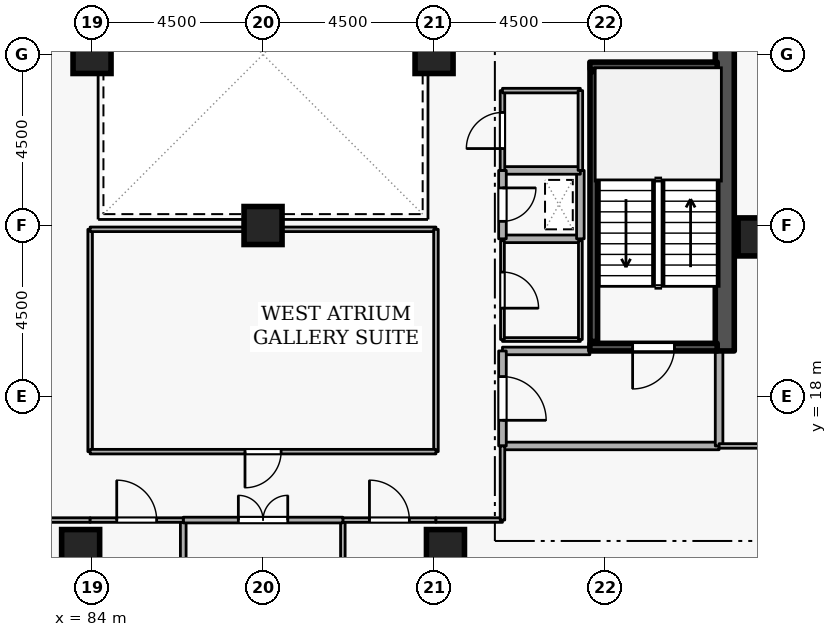
"""IFC4 building model, lengths in metres.
Left out: names, types, materials, properties, quantities, classifications, styles, units other than length and angle.
Written with IfcOpenShell. Run it as: python <this file> out.ifc"""

import sys

from ifc_helpers import new_model, si_unit, direction, frame, frame_2d, origin, origin_2d, place, context, subcontext, project, spatial, rectangle, extrude, element, fill, save


model = new_model("IFC4")
c1 = context("Model", 3, precision=1e-05, world=origin(), true_north=direction((0.0, 1.0)))
c2 = subcontext(c1, "Body", "Model", "MODEL_VIEW")
j1 = project(units=[si_unit("LENGTHUNIT", "METRE"), si_unit("PLANEANGLEUNIT", "RADIAN")], contexts=[c1])
p1 = place(None, origin())
s1 = spatial("IfcSite", under=j1, at=p1, CompositionType="ELEMENT")
p2 = place(p1, origin())
s2 = spatial("IfcBuilding", under=s1, at=p2, CompositionType="ELEMENT")
p3 = place(p2, frame((0.0, 0.0, 203.7)))
s3 = spatial("IfcBuildingStorey", under=s2, at=p3, CompositionType="ELEMENT", Elevation=203.7)
p4 = place(p3, frame((100.65, 19.2, 0.0), z_axis=(0.0, 0.0, 1.0), x_axis=(0.0, 1.0, 0.0)))
e1 = element("IfcWall", 1, at=p4, inside=s3, PredefinedType="SHEAR", context=c2, shape_type="SweptSolid", body=[
    extrude(rectangle(XDim=15.6, YDim=0.5, at=frame_2d((7.8, 0.0))), origin(), (0.0, 0.0, 1.0), 3.6),
])
for number, where, z_axis, x_axis in (
    (2, (93.3, 14.0, 0.0), (0.0, 0.0, 1.0), (1.0, 0.0, 0.0)),
    (3, (83.7, 14.0, 0.0), (0.0, 0.0, 1.0), (1.0, 0.0, 0.0)),
    (4, (101.5, 22.2, 0.0), (0.0, 0.0, 1.0), (1.0, 0.0, 0.0)),
    (5, (93.0, 27.0, 0.0), (0.0, 0.0, 1.0), (1.0, 0.0, 0.0)),
    (6, (84.0, 27.0, 0.0), (0.0, 0.0, 1.0), (1.0, 0.0, 0.0)),
    (7, (88.5, 22.5, 0.0), (0.0, 0.0, 1.0), (1.0, 0.0, 0.0)),
):
    element("IfcColumn", number, at=place(p3, frame(where, z_axis=z_axis, x_axis=x_axis)), inside=s3, PredefinedType="COLUMN", context=c2, shape_type="SweptSolid", body=[
        extrude(rectangle(XDim=1.0, YDim=1.0, at=origin_2d()), origin(), (0.0, 0.0, 1.0), 3.6),
    ])
p5 = place(p3, frame((100.45, 19.3, 0.0), z_axis=(0.0, 0.0, 1.0), x_axis=(-1.0, 0.0, 0.0)))
e8 = element("IfcWall", 8, at=p5, inside=s3, PredefinedType="SHEAR", context=c2, shape_type="SweptSolid", body=[
    extrude(rectangle(XDim=3.35, YDim=0.2, at=frame_2d((1.675, 0.0))), origin(), (0.0, 0.0, 1.0), 3.6),
])
p6 = place(p5, frame((1.125, 0.0, 0.0)))
e9 = element("IfcOpeningElement", 9, at=p6, cuts=e8, PredefinedType="OPENING", context=c2, shape_type="SweptSolid", body=[
    extrude(rectangle(XDim=1.1, YDim=2.1, at=frame_2d((0.55, 1.05))), frame((0.0, 0.11, 0.0), z_axis=(0.0, -1.0, 0.0), x_axis=(1.0, 0.0, 0.0)), (0.0, 0.0, 1.0), 0.22),
])
p7 = place(p3, frame((97.1, 26.7, 0.0), z_axis=(0.0, 0.0, 1.0), x_axis=(1.0, 0.0, 0.0)))
e10 = element("IfcWall", 10, at=p7, inside=s3, PredefinedType="SHEAR", context=c2, shape_type="SweptSolid", body=[
    extrude(rectangle(XDim=3.35, YDim=0.2, at=frame_2d((1.675, 0.0))), origin(), (0.0, 0.0, 1.0), 3.6),
])
p8 = place(p3, frame((97.203, 26.55, 0.0), z_axis=(0.0, 0.0, 1.0), x_axis=(0.0, -1.0, 0.0)))
e11 = element("IfcWall", 11, at=p8, inside=s3, PredefinedType="SHEAR", context=c2, shape_type="SweptSolid", body=[
    extrude(rectangle(XDim=7.1, YDim=0.2, at=frame_2d((3.55, 0.0))), origin(), (0.0, 0.0, 1.0), 3.6),
])
p9 = place(p3, frame((94.8, 16.7, 0.0), z_axis=(0.0, 0.0, 1.0), x_axis=(1.0, 0.0, 0.0)))
e12 = element("IfcWall", 12, at=p9, inside=s3, PredefinedType="STANDARD", context=c2, shape_type="SweptSolid", body=[
    extrude(rectangle(XDim=5.7, YDim=0.2, at=frame_2d((2.85, 0.0))), origin(), (0.0, 0.0, 1.0), 3.34),
])
p10 = place(p3, frame((100.5, 16.7, 0.0), z_axis=(0.0, 0.0, 1.0), x_axis=(0.0, 1.0, 0.0)))
e13 = element("IfcWall", 13, at=p10, inside=s3, PredefinedType="STANDARD", context=c2, shape_type="SweptSolid", body=[
    extrude(rectangle(XDim=2.5, YDim=0.2, at=frame_2d((1.25, 0.0))), origin(), (0.0, 0.0, 1.0), 3.34),
])
p11 = place(p3, frame((97.1, 19.2, 0.0), z_axis=(0.0, 0.0, 1.0), x_axis=(-1.0, 0.0, 0.0)))
e14 = element("IfcWall", 14, at=p11, inside=s3, PredefinedType="STANDARD", context=c2, shape_type="SweptSolid", body=[
    extrude(rectangle(XDim=2.3, YDim=0.2, at=frame_2d((1.15, 0.0))), origin(), (0.0, 0.0, 1.0), 2.545),
])
p12 = place(p3, frame((94.8, 19.2, 0.0), z_axis=(0.0, 0.0, 1.0), x_axis=(0.0, -1.0, 0.0)))
e15 = element("IfcWall", 15, at=p12, inside=s3, PredefinedType="STANDARD", context=c2, shape_type="SweptSolid", body=[
    extrude(rectangle(XDim=2.5, YDim=0.2, at=frame_2d((1.25, 0.0))), origin(), (0.0, 0.0, 1.0), 3.34),
])
p13 = place(p12, frame((0.675, 0.0, 0.0)))
e16 = element("IfcOpeningElement", 16, at=p13, cuts=e15, PredefinedType="OPENING", context=c2, shape_type="SweptSolid", body=[
    extrude(rectangle(XDim=1.15, YDim=2.1, at=frame_2d((0.575, 1.05))), frame((0.0, 0.11, 0.0), z_axis=(0.0, -1.0, 0.0), x_axis=(1.0, 0.0, 0.0)), (0.0, 0.0, 1.0), 0.22),
])
p14 = place(p3, frame((94.8, 22.15, 0.0), z_axis=(0.0, 0.0, 1.0), x_axis=(1.0, 0.0, 0.0)))
e17 = element("IfcWall", 17, at=p14, inside=s3, PredefinedType="STANDARD", context=c2, shape_type="SweptSolid", body=[
    extrude(rectangle(XDim=2.05, YDim=0.2, at=frame_2d((1.025, 0.0))), origin(), (0.0, 0.0, 1.0), 3.34),
])
p15 = place(p3, frame((96.85, 22.15, 0.0), z_axis=(0.0, 0.0, 1.0), x_axis=(0.0, 1.0, 0.0)))
e18 = element("IfcWall", 18, at=p15, inside=s3, PredefinedType="STANDARD", context=c2, shape_type="SweptSolid", body=[
    extrude(rectangle(XDim=1.8, YDim=0.2, at=frame_2d((0.9, 0.0))), origin(), (0.0, 0.0, 1.0), 3.34),
])
p16 = place(p3, frame((96.85, 23.95, 0.0), z_axis=(0.0, 0.0, 1.0), x_axis=(-1.0, 0.0, 0.0)))
e19 = element("IfcWall", 19, at=p16, inside=s3, PredefinedType="STANDARD", context=c2, shape_type="SweptSolid", body=[
    extrude(rectangle(XDim=2.05, YDim=0.2, at=frame_2d((1.025, 0.0))), origin(), (0.0, 0.0, 1.0), 3.34),
])
p17 = place(p3, frame((94.8, 23.95, 0.0), z_axis=(0.0, 0.0, 1.0), x_axis=(0.0, -1.0, 0.0)))
e20 = element("IfcWall", 20, at=p17, inside=s3, PredefinedType="STANDARD", context=c2, shape_type="SweptSolid", body=[
    extrude(rectangle(XDim=1.8, YDim=0.2, at=frame_2d((0.9, 0.0))), origin(), (0.0, 0.0, 1.0), 3.34),
])
p18 = place(p17, frame((0.46, 0.0, 0.0)))
e21 = element("IfcOpeningElement", 21, at=p18, cuts=e20, PredefinedType="OPENING", context=c2, shape_type="SweptSolid", body=[
    extrude(rectangle(XDim=0.88, YDim=2.04, at=frame_2d((0.44, 1.02))), frame((0.0, 0.11, 0.0), z_axis=(0.0, -1.0, 0.0), x_axis=(1.0, 0.0, 0.0)), (0.0, 0.0, 1.0), 0.22),
])
p19 = place(p3, frame((94.8, 19.5, 0.0), z_axis=(0.0, 0.0, 1.0), x_axis=(1.0, 0.0, 0.0)))
e22 = element("IfcWall", 22, at=p19, inside=s3, PredefinedType="PARTITIONING", context=c2, shape_type="SweptSolid", body=[
    extrude(rectangle(XDim=2.05, YDim=0.1, at=frame_2d((1.025, 0.0))), origin(), (0.0, 0.0, 1.0), 2.545),
])
p20 = place(p3, frame((96.85, 19.5, 0.0), z_axis=(0.0, 0.0, 1.0), x_axis=(0.0, 1.0, 0.0)))
e23 = element("IfcWall", 23, at=p20, inside=s3, PredefinedType="PARTITIONING", context=c2, shape_type="SweptSolid", body=[
    extrude(rectangle(XDim=2.6, YDim=0.1, at=frame_2d((1.3, 0.0))), origin(), (0.0, 0.0, 1.0), 3.34),
])
p21 = place(p3, frame((94.8, 22.1, 0.0), z_axis=(0.0, 0.0, 1.0), x_axis=(0.0, -1.0, 0.0)))
e24 = element("IfcWall", 24, at=p21, inside=s3, PredefinedType="PARTITIONING", context=c2, shape_type="SweptSolid", body=[
    extrude(rectangle(XDim=2.6, YDim=0.1, at=frame_2d((1.3, 0.0))), origin(), (0.0, 0.0, 1.0), 3.34),
])
p22 = place(p21, frame((0.825, 0.0, 0.0)))
e25 = element("IfcOpeningElement", 25, at=p22, cuts=e24, PredefinedType="OPENING", context=c2, shape_type="SweptSolid", body=[
    extrude(rectangle(XDim=0.95, YDim=2.1, at=frame_2d((0.475, 1.05))), frame((0.0, 0.06, 0.0), z_axis=(0.0, -1.0, 0.0), x_axis=(1.0, 0.0, 0.0)), (0.0, 0.0, 1.0), 0.12),
])
p23 = place(p3, frame((94.8, 23.95, 0.0), z_axis=(0.0, 0.0, 1.0), x_axis=(0.0, 1.0, 0.0)))
e26 = element("IfcWall", 26, at=p23, inside=s3, PredefinedType="PARTITIONING", context=c2, shape_type="SweptSolid", body=[
    extrude(rectangle(XDim=2.1, YDim=0.12, at=frame_2d((1.05, 0.0))), origin(), (0.0, 0.0, 1.0), 3.34),
])
p24 = place(p23, frame((0.575, 0.0, 0.0)))
e27 = element("IfcOpeningElement", 27, at=p24, cuts=e26, PredefinedType="OPENING", context=c2, shape_type="SweptSolid", body=[
    extrude(rectangle(XDim=0.95, YDim=2.1, at=frame_2d((0.475, 1.05))), frame((0.0, 0.07, 0.0), z_axis=(0.0, -1.0, 0.0), x_axis=(1.0, 0.0, 0.0)), (0.0, 0.0, 1.0), 0.14),
])
p25 = place(p3, frame((94.8, 26.05, 0.0), z_axis=(0.0, 0.0, 1.0), x_axis=(1.0, 0.0, 0.0)))
e28 = element("IfcWall", 28, at=p25, inside=s3, PredefinedType="PARTITIONING", context=c2, shape_type="SweptSolid", body=[
    extrude(rectangle(XDim=2.05, YDim=0.12, at=frame_2d((1.025, 0.0))), origin(), (0.0, 0.0, 1.0), 3.34),
])
p26 = place(p3, frame((96.85, 26.05, 0.0), z_axis=(0.0, 0.0, 1.0), x_axis=(0.0, -1.0, 0.0)))
e29 = element("IfcWall", 29, at=p26, inside=s3, PredefinedType="PARTITIONING", context=c2, shape_type="SweptSolid", body=[
    extrude(rectangle(XDim=2.1, YDim=0.12, at=frame_2d((1.05, 0.0))), origin(), (0.0, 0.0, 1.0), 3.34),
])
p27 = place(p3, frame((90.6, 3.28, 0.0), z_axis=(0.0, 0.0, 1.0), x_axis=(0.0, 1.0, 0.0)))
e30 = element("IfcWall", 30, at=p27, inside=s3, PredefinedType="PARTITIONING", context=c2, shape_type="SweptSolid", body=[
    extrude(rectangle(XDim=11.47, YDim=0.12, at=frame_2d((5.735, 0.0))), origin(), (0.0, 0.0, 1.0), 3.34),
])
p28 = place(p3, frame((90.6, 14.75, 0.0), z_axis=(0.0, 0.0, 1.0), x_axis=(1.0, 0.0, 0.0)))
e31 = element("IfcWall", 31, at=p28, inside=s3, PredefinedType="PARTITIONING", context=c2, shape_type="SweptSolid", body=[
    extrude(rectangle(XDim=2.45, YDim=0.12, at=frame_2d((1.225, 0.0))), origin(), (0.0, 0.0, 1.0), 3.34),
])
p29 = place(p28, frame((0.7, 0.0, 0.0)))
e32 = element("IfcOpeningElement", 32, at=p29, cuts=e31, PredefinedType="OPENING", context=c2, shape_type="SweptSolid", body=[
    extrude(rectangle(XDim=1.05, YDim=2.1, at=frame_2d((0.525, 1.05))), frame((0.0, 0.07, 0.0), z_axis=(0.0, -1.0, 0.0), x_axis=(1.0, 0.0, 0.0)), (0.0, 0.0, 1.0), 0.14),
])
p30 = place(p3, frame((93.05, 14.75, 0.0), z_axis=(0.0, 0.0, 1.0), x_axis=(1.0, 0.0, 0.0)))
e33 = element("IfcWall", 33, at=p30, inside=s3, PredefinedType="PARTITIONING", context=c2, shape_type="SweptSolid", body=[
    extrude(rectangle(XDim=1.75, YDim=0.12, at=frame_2d((0.875, 0.0))), origin(), (0.0, 0.0, 1.0), 3.34),
])
p31 = place(p3, frame((94.8, 14.75, 0.0), z_axis=(0.0, 0.0, 1.0), x_axis=(0.0, 1.0, 0.0)))
e34 = element("IfcWall", 34, at=p31, inside=s3, PredefinedType="PARTITIONING", context=c2, shape_type="SweptSolid", body=[
    extrude(rectangle(XDim=1.95, YDim=0.12, at=frame_2d((0.975, 0.0))), origin(), (0.0, 0.0, 1.0), 3.34),
])
p32 = place(p3, frame((100.5, 16.7, 0.0), z_axis=(0.0, 0.0, 1.0), x_axis=(1.0, 0.0, 0.0)))
e35 = element("IfcWall", 35, at=p32, inside=s3, PredefinedType="PARTITIONING", context=c2, shape_type="SweptSolid", body=[
    extrude(rectangle(XDim=5.72, YDim=0.12, at=frame_2d((2.86, 0.0))), origin(), (0.0, 0.0, 1.0), 3.34),
])
p33 = place(p3, frame((86.4, 3.28, 0.0), z_axis=(0.0, 0.0, 1.0), x_axis=(0.0, 1.0, 0.0)))
e36 = element("IfcWall", 36, at=p33, inside=s3, PredefinedType="PARTITIONING", context=c2, shape_type="SweptSolid", body=[
    extrude(rectangle(XDim=11.47, YDim=0.15, at=frame_2d((5.735, 0.0))), origin(), (0.0, 0.0, 1.0), 3.34),
])
p34 = place(p3, frame((86.4, 14.75, 0.0), z_axis=(0.0, 0.0, 1.0), x_axis=(1.0, 0.0, 0.0)))
e37 = element("IfcWall", 37, at=p34, inside=s3, PredefinedType="PARTITIONING", context=c2, shape_type="SweptSolid", body=[
    extrude(rectangle(XDim=4.2, YDim=0.15, at=frame_2d((2.1, 0.0))), origin(), (0.0, 0.0, 1.0), 3.34),
])
p35 = place(p34, frame((1.45, 0.0, 0.0)))
e38 = element("IfcOpeningElement", 38, at=p35, cuts=e37, PredefinedType="OPENING", context=c2, shape_type="SweptSolid", body=[
    extrude(rectangle(XDim=1.3, YDim=2.12, at=frame_2d((0.65, 1.06))), frame((0.0, 0.085, 0.0), z_axis=(0.0, -1.0, 0.0), x_axis=(1.0, 0.0, 0.0)), (0.0, 0.0, 1.0), 0.17),
])
p36 = place(p3, frame((82.2, 14.75, 0.0), z_axis=(0.0, 0.0, 1.0), x_axis=(1.0, 0.0, 0.0)))
e39 = element("IfcWall", 39, at=p36, inside=s3, PredefinedType="PARTITIONING", context=c2, shape_type="SweptSolid", body=[
    extrude(rectangle(XDim=1.75, YDim=0.12, at=frame_2d((0.875, 0.0))), origin(), (0.0, 0.0, 1.0), 3.34),
])
p37 = place(p3, frame((83.95, 14.75, 0.0), z_axis=(0.0, 0.0, 1.0), x_axis=(1.0, 0.0, 0.0)))
e40 = element("IfcWall", 40, at=p37, inside=s3, PredefinedType="PARTITIONING", context=c2, shape_type="SweptSolid", body=[
    extrude(rectangle(XDim=2.45, YDim=0.12, at=frame_2d((1.225, 0.0))), origin(), (0.0, 0.0, 1.0), 3.34),
])
p38 = place(p37, frame((0.7, 0.0, 0.0)))
e41 = element("IfcOpeningElement", 41, at=p38, cuts=e40, PredefinedType="OPENING", context=c2, shape_type="SweptSolid", body=[
    extrude(rectangle(XDim=1.05, YDim=2.1, at=frame_2d((0.525, 1.05))), frame((0.0, 0.07, 0.0), z_axis=(0.0, -1.0, 0.0), x_axis=(1.0, 0.0, 0.0)), (0.0, 0.0, 1.0), 0.14),
])
p39 = place(p3, frame((83.95, 16.55, 0.0), z_axis=(0.0, 0.0, 1.0), x_axis=(0.0, 1.0, 0.0)))
e42 = element("IfcWall", 42, at=p39, inside=s3, PredefinedType="PARTITIONING", context=c2, shape_type="SweptSolid", body=[
    extrude(rectangle(XDim=5.85, YDim=0.12, at=frame_2d((2.925, 0.0))), origin(), (0.0, 0.0, 1.0), 3.34),
])
p40 = place(p3, frame((83.95, 22.4, 0.0), z_axis=(0.0, 0.0, 1.0), x_axis=(1.0, 0.0, 0.0)))
e43 = element("IfcWall", 43, at=p40, inside=s3, PredefinedType="PARTITIONING", context=c2, shape_type="SweptSolid", body=[
    extrude(rectangle(XDim=9.1, YDim=0.12, at=frame_2d((4.55, 0.0))), origin(), (0.0, 0.0, 1.0), 3.34),
])
p41 = place(p3, frame((93.05, 22.4, 0.0), z_axis=(0.0, 0.0, 1.0), x_axis=(0.0, -1.0, 0.0)))
e44 = element("IfcWall", 44, at=p41, inside=s3, PredefinedType="PARTITIONING", context=c2, shape_type="SweptSolid", body=[
    extrude(rectangle(XDim=5.85, YDim=0.12, at=frame_2d((2.925, 0.0))), origin(), (0.0, 0.0, 1.0), 3.34),
])
p42 = place(p3, frame((93.05, 16.55, 0.0), z_axis=(0.0, 0.0, 1.0), x_axis=(-1.0, 0.0, 0.0)))
e45 = element("IfcWall", 45, at=p42, inside=s3, PredefinedType="PARTITIONING", context=c2, shape_type="SweptSolid", body=[
    extrude(rectangle(XDim=9.1, YDim=0.12, at=frame_2d((4.55, 0.0))), origin(), (0.0, 0.0, 1.0), 3.34),
])
p43 = place(p42, frame((4.075, 0.0, 0.0)))
e46 = element("IfcOpeningElement", 46, at=p43, cuts=e45, PredefinedType="OPENING", context=c2, shape_type="SweptSolid", body=[
    extrude(rectangle(XDim=0.95, YDim=2.1, at=frame_2d((0.475, 1.05))), frame((0.0, 0.07, 0.0), z_axis=(0.0, -1.0, 0.0), x_axis=(1.0, 0.0, 0.0)), (0.0, 0.0, 1.0), 0.14),
])
p44 = place(p6, origin())
e47 = element("IfcDoor", 47, at=p44, inside=s3, OperationType="SINGLE_SWING_RIGHT", PredefinedType="DOOR", context=c2, shape_type="SweptSolid", body=[
    extrude(rectangle(XDim=1.1, YDim=2.1, at=frame_2d((0.55, 1.05))), frame((0.0, 0.025, 0.0), z_axis=(0.0, -1.0, 0.0), x_axis=(1.0, 0.0, 0.0)), (0.0, 0.0, 1.0), 0.05),
])
fill(e9, e47)
p45 = place(p13, origin())
e48 = element("IfcDoor", 48, at=p45, inside=s3, OperationType="SINGLE_SWING_RIGHT", PredefinedType="DOOR", context=c2, shape_type="SweptSolid", body=[
    extrude(rectangle(XDim=1.15, YDim=2.1, at=frame_2d((0.575, 1.05))), frame((0.0, 0.025, 0.0), z_axis=(0.0, -1.0, 0.0), x_axis=(1.0, 0.0, 0.0)), (0.0, 0.0, 1.0), 0.05),
])
fill(e16, e48)
p46 = place(p18, origin())
e49 = element("IfcDoor", 49, at=p46, inside=s3, OperationType="SINGLE_SWING_LEFT", PredefinedType="DOOR", context=c2, shape_type="SweptSolid", body=[
    extrude(rectangle(XDim=0.88, YDim=2.04, at=frame_2d((0.44, 1.02))), frame((0.0, 0.025, 0.0), z_axis=(0.0, -1.0, 0.0), x_axis=(1.0, 0.0, 0.0)), (0.0, 0.0, 1.0), 0.05),
])
fill(e21, e49)
p47 = place(p22, origin())
e50 = element("IfcDoor", 50, at=p47, inside=s3, OperationType="SINGLE_SWING_RIGHT", PredefinedType="DOOR", context=c2, shape_type="SweptSolid", body=[
    extrude(rectangle(XDim=0.95, YDim=2.1, at=frame_2d((0.475, 1.05))), frame((0.0, 0.025, 0.0), z_axis=(0.0, -1.0, 0.0), x_axis=(1.0, 0.0, 0.0)), (0.0, 0.0, 1.0), 0.05),
])
fill(e25, e50)
p48 = place(p24, origin())
e51 = element("IfcDoor", 51, at=p48, inside=s3, OperationType="SINGLE_SWING_LEFT", PredefinedType="DOOR", context=c2, shape_type="SweptSolid", body=[
    extrude(rectangle(XDim=0.95, YDim=2.1, at=frame_2d((0.475, 1.05))), frame((0.0, 0.025, 0.0), z_axis=(0.0, -1.0, 0.0), x_axis=(1.0, 0.0, 0.0)), (0.0, 0.0, 1.0), 0.05),
])
fill(e27, e51)
p49 = place(p29, origin())
e52 = element("IfcDoor", 52, at=p49, inside=s3, OperationType="SINGLE_SWING_LEFT", PredefinedType="DOOR", context=c2, shape_type="SweptSolid", body=[
    extrude(rectangle(XDim=1.05, YDim=2.1, at=frame_2d((0.525, 1.05))), frame((0.0, 0.025, 0.0), z_axis=(0.0, -1.0, 0.0), x_axis=(1.0, 0.0, 0.0)), (0.0, 0.0, 1.0), 0.05),
])
fill(e32, e52)
p50 = place(p35, origin())
e53 = element("IfcDoor", 53, at=p50, inside=s3, OperationType="DOUBLE_DOOR_SINGLE_SWING", PredefinedType="DOOR", context=c2, shape_type="SweptSolid", body=[
    extrude(rectangle(XDim=1.3, YDim=2.12, at=frame_2d((0.65, 1.06))), frame((0.0, 0.025, 0.0), z_axis=(0.0, -1.0, 0.0), x_axis=(1.0, 0.0, 0.0)), (0.0, 0.0, 1.0), 0.05),
])
fill(e38, e53)
p51 = place(p38, origin())
e54 = element("IfcDoor", 54, at=p51, inside=s3, OperationType="SINGLE_SWING_LEFT", PredefinedType="DOOR", context=c2, shape_type="SweptSolid", body=[
    extrude(rectangle(XDim=1.05, YDim=2.1, at=frame_2d((0.525, 1.05))), frame((0.0, 0.025, 0.0), z_axis=(0.0, -1.0, 0.0), x_axis=(1.0, 0.0, 0.0)), (0.0, 0.0, 1.0), 0.05),
])
fill(e41, e54)
p52 = place(p43, origin())
e55 = element("IfcDoor", 55, at=p52, inside=s3, OperationType="SINGLE_SWING_RIGHT", PredefinedType="DOOR", context=c2, shape_type="SweptSolid", body=[
    extrude(rectangle(XDim=0.95, YDim=2.1, at=frame_2d((0.475, 1.05))), frame((0.0, 0.025, 0.0), z_axis=(0.0, -1.0, 0.0), x_axis=(1.0, 0.0, 0.0)), (0.0, 0.0, 1.0), 0.05),
])
fill(e46, e55)
save(model, sys.argv[1])
